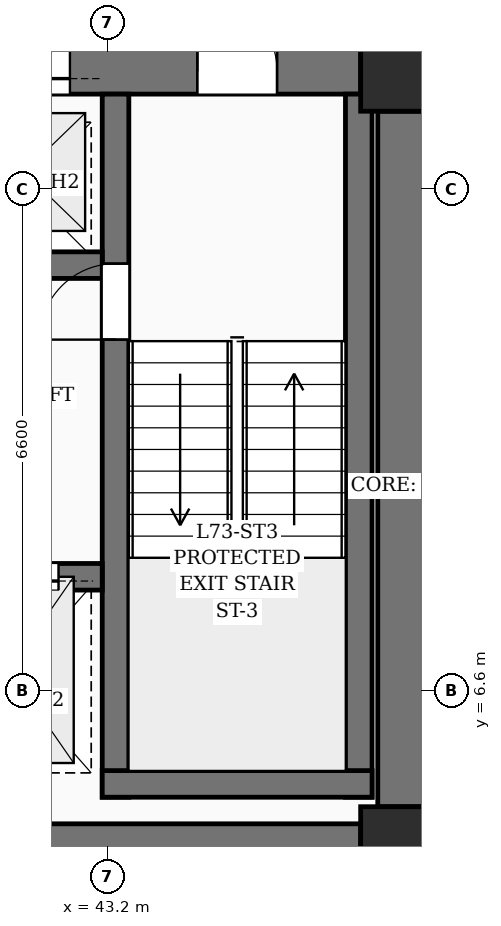
"""IFC4 building model, lengths in metres.
Left out: names, types, materials, properties, quantities, classifications, styles, units other than length and angle.
Written with IfcOpenShell. Run it as: python <this file> out.ifc"""

import sys

from ifc_helpers import new_model, si_unit, direction, frame, frame_2d, origin, origin_2d, place, context, subcontext, project, spatial, rectangle, extrude, element, fill, save


model = new_model("IFC4")
c1 = context("Model", 3, precision=1e-05, world=origin(), true_north=direction((0.0, 1.0)))
c2 = subcontext(c1, "Body", "Model", "MODEL_VIEW")
j1 = project(units=[si_unit("LENGTHUNIT", "METRE"), si_unit("PLANEANGLEUNIT", "RADIAN")], contexts=[c1])
p1 = place(None, origin())
s1 = spatial("IfcSite", under=j1, at=p1, CompositionType="ELEMENT")
p2 = place(p1, origin())
s2 = spatial("IfcBuilding", under=s1, at=p2, CompositionType="ELEMENT")
p3 = place(p2, frame((0.0, 0.0, 282.0)))
s3 = spatial("IfcBuildingStorey", under=s2, at=p3, CompositionType="ELEMENT", Elevation=282.0)
for number, where, z_axis, x_axis in (
    (1, (47.05, 4.55, 0.0), (0.0, 0.0, 1.0), (1.0, 0.0, 0.0)),
    (2, (47.05, 14.75, 0.0), (0.0, 0.0, 1.0), (1.0, 0.0, 0.0)),
):
    element("IfcColumn", number, at=place(p3, frame(where, z_axis=z_axis, x_axis=x_axis)), inside=s3, PredefinedType="COLUMN", context=c2, shape_type="SweptSolid", body=[
        extrude(rectangle(XDim=1.05, YDim=1.05, at=origin_2d()), origin(), (0.0, 0.0, 1.0), 3.75),
    ])
p4 = place(p3, frame((35.675, 4.55, 0.0), z_axis=(0.0, 0.0, 1.0), x_axis=(1.0, 0.0, 0.0)))
e3 = element("IfcWall", 3, at=p4, inside=s3, PredefinedType="SHEAR", context=c2, shape_type="SweptSolid", body=[
    extrude(rectangle(XDim=10.85, YDim=0.6, at=frame_2d((5.425, 0.0))), origin(), (0.0, 0.0, 1.0), 3.75),
])
p5 = place(p3, frame((35.675, 14.75, 0.0), z_axis=(0.0, 0.0, 1.0), x_axis=(1.0, 0.0, 0.0)))
e4 = element("IfcWall", 4, at=p5, inside=s3, PredefinedType="SHEAR", context=c2, shape_type="SweptSolid", body=[
    extrude(rectangle(XDim=10.85, YDim=0.6, at=frame_2d((5.425, 0.0))), origin(), (0.0, 0.0, 1.0), 3.75),
])
p6 = place(p5, frame((1.1, 0.0, 0.0)))
e5 = element("IfcOpeningElement", 5, at=p6, cuts=e4, PredefinedType="OPENING", context=c2, shape_type="SweptSolid", body=[
    extrude(rectangle(XDim=1.05, YDim=2.15, at=frame_2d((0.525, 1.075))), frame((0.0, 0.31, 0.0), z_axis=(0.0, -1.0, 0.0), x_axis=(1.0, 0.0, 0.0)), (0.0, 0.0, 1.0), 0.62),
])
p7 = place(p5, frame((8.7, 0.0, 0.0)))
e6 = element("IfcOpeningElement", 6, at=p7, cuts=e4, PredefinedType="OPENING", context=c2, shape_type="SweptSolid", body=[
    extrude(rectangle(XDim=1.05, YDim=2.15, at=frame_2d((0.525, 1.075))), frame((0.0, 0.31, 0.0), z_axis=(0.0, -1.0, 0.0), x_axis=(1.0, 0.0, 0.0)), (0.0, 0.0, 1.0), 0.62),
])
p8 = place(p5, frame((3.825, 0.0, 0.0)))
e7 = element("IfcOpeningElement", 7, at=p8, cuts=e4, PredefinedType="OPENING", context=c2, shape_type="SweptSolid", body=[
    extrude(rectangle(XDim=1.2, YDim=2.2, at=frame_2d((0.6, 1.1))), frame((0.0, 0.31, 0.0), z_axis=(0.0, -1.0, 0.0), x_axis=(1.0, 0.0, 0.0)), (0.0, 0.0, 1.0), 0.62),
])
p9 = place(p5, frame((5.825, 0.0, 0.0)))
e8 = element("IfcOpeningElement", 8, at=p9, cuts=e4, PredefinedType="OPENING", context=c2, shape_type="SweptSolid", body=[
    extrude(rectangle(XDim=1.2, YDim=2.2, at=frame_2d((0.6, 1.1))), frame((0.0, 0.31, 0.0), z_axis=(0.0, -1.0, 0.0), x_axis=(1.0, 0.0, 0.0)), (0.0, 0.0, 1.0), 0.62),
])
p10 = place(p3, frame((47.05, 5.075, 0.0), z_axis=(0.0, 0.0, 1.0), x_axis=(0.0, 1.0, 0.0)))
e9 = element("IfcWall", 9, at=p10, inside=s3, PredefinedType="SHEAR", context=c2, shape_type="SweptSolid", body=[
    extrude(rectangle(XDim=9.15, YDim=0.6, at=frame_2d((4.575, 0.0))), origin(), (0.0, 0.0, 1.0), 3.75),
])
p11 = place(p3, frame((43.3, 5.2, 0.0), z_axis=(0.0, 0.0, 1.0), x_axis=(0.0, 1.0, 0.0)))
e10 = element("IfcWall", 10, at=p11, inside=s3, PredefinedType="SOLIDWALL", context=c2, shape_type="SweptSolid", body=[
    extrude(rectangle(XDim=9.25, YDim=0.35, at=frame_2d((4.625, 0.0))), origin(), (0.0, 0.0, 1.0), 3.75),
])
p12 = place(p11, frame((6.02, 0.0, 0.0)))
e11 = element("IfcOpeningElement", 11, at=p12, cuts=e10, PredefinedType="OPENING", context=c2, shape_type="SweptSolid", body=[
    extrude(rectangle(XDim=1.0, YDim=2.15, at=frame_2d((0.5, 1.075))), frame((0.0, 0.185, 0.0), z_axis=(0.0, -1.0, 0.0), x_axis=(1.0, 0.0, 0.0)), (0.0, 0.0, 1.0), 0.37),
])
p13 = place(p3, frame((46.5, 5.2, 0.0), z_axis=(0.0, 0.0, 1.0), x_axis=(0.0, 1.0, 0.0)))
e12 = element("IfcWall", 12, at=p13, inside=s3, PredefinedType="SOLIDWALL", context=c2, shape_type="SweptSolid", body=[
    extrude(rectangle(XDim=9.25, YDim=0.35, at=frame_2d((4.625, 0.0))), origin(), (0.0, 0.0, 1.0), 3.75),
])
p14 = place(p3, frame((43.125, 5.375, 0.0), z_axis=(0.0, 0.0, 1.0), x_axis=(1.0, 0.0, 0.0)))
e13 = element("IfcWall", 13, at=p14, inside=s3, PredefinedType="SOLIDWALL", context=c2, shape_type="SweptSolid", body=[
    extrude(rectangle(XDim=3.55, YDim=0.35, at=frame_2d((1.775, 0.0))), origin(), (0.0, 0.0, 1.0), 3.75),
])
p15 = place(p3, frame((40.55, 8.1, 0.0), z_axis=(0.0, 0.0, 1.0), x_axis=(1.0, 0.0, 0.0)))
e14 = element("IfcWall", 14, at=p15, inside=s3, PredefinedType="SOLIDWALL", context=c2, shape_type="SweptSolid", body=[
    extrude(rectangle(XDim=2.575, YDim=0.35, at=frame_2d((1.288, 0.0))), origin(), (0.0, 0.0, 1.0), 3.75),
])
p16 = place(p15, frame((0.7, 0.0, 0.0)))
e15 = element("IfcOpeningElement", 15, at=p16, cuts=e14, PredefinedType="OPENING", context=c2, shape_type="SweptSolid", body=[
    extrude(rectangle(XDim=1.3, YDim=2.25, at=frame_2d((0.65, 1.125))), frame((0.0, 0.185, 0.0), z_axis=(0.0, -1.0, 0.0), x_axis=(1.0, 0.0, 0.0)), (0.0, 0.0, 1.0), 0.37),
])
p17 = place(p3, frame((39.075, 12.2, 0.0), z_axis=(0.0, 0.0, 1.0), x_axis=(1.0, 0.0, 0.0)))
e16 = element("IfcWall", 16, at=p17, inside=s3, PredefinedType="SOLIDWALL", context=c2, shape_type="SweptSolid", body=[
    extrude(rectangle(XDim=4.05, YDim=0.35, at=frame_2d((2.025, 0.0))), origin(), (0.0, 0.0, 1.0), 3.75),
])
p18 = place(p7, origin())
e17 = element("IfcDoor", 17, at=p18, inside=s3, OperationType="SINGLE_SWING_LEFT", PredefinedType="DOOR", context=c2, shape_type="SweptSolid", body=[
    extrude(rectangle(XDim=1.05, YDim=2.15, at=frame_2d((0.525, 1.075))), frame((0.0, 0.025, 0.0), z_axis=(0.0, -1.0, 0.0), x_axis=(1.0, 0.0, 0.0)), (0.0, 0.0, 1.0), 0.05),
])
fill(e6, e17)
p19 = place(p12, origin())
e18 = element("IfcDoor", 18, at=p19, inside=s3, OperationType="SINGLE_SWING_LEFT", PredefinedType="DOOR", context=c2, shape_type="SweptSolid", body=[
    extrude(rectangle(XDim=1.0, YDim=2.15, at=frame_2d((0.5, 1.075))), frame((0.0, 0.025, 0.0), z_axis=(0.0, -1.0, 0.0), x_axis=(1.0, 0.0, 0.0)), (0.0, 0.0, 1.0), 0.05),
])
fill(e11, e18)
p20 = place(p16, origin())
e19 = element("IfcDoor", 19, at=p20, inside=s3, OperationType="DOUBLE_DOOR_SLIDING", PredefinedType="DOOR", context=c2, shape_type="SweptSolid", body=[
    extrude(rectangle(XDim=1.3, YDim=2.25, at=frame_2d((0.65, 1.125))), frame((0.0, 0.025, 0.0), z_axis=(0.0, -1.0, 0.0), x_axis=(1.0, 0.0, 0.0)), (0.0, 0.0, 1.0), 0.05),
])
fill(e15, e19)
p21 = place(p9, origin())
e20 = element("IfcDoor", 20, at=p21, inside=s3, OperationType="DOUBLE_DOOR_SLIDING", PredefinedType="DOOR", context=c2, shape_type="SweptSolid", body=[
    extrude(rectangle(XDim=1.2, YDim=2.2, at=frame_2d((0.6, 1.1))), frame((0.0, 0.025, 0.0), z_axis=(0.0, -1.0, 0.0), x_axis=(1.0, 0.0, 0.0)), (0.0, 0.0, 1.0), 0.05),
])
fill(e8, e20)
save(model, sys.argv[1])
